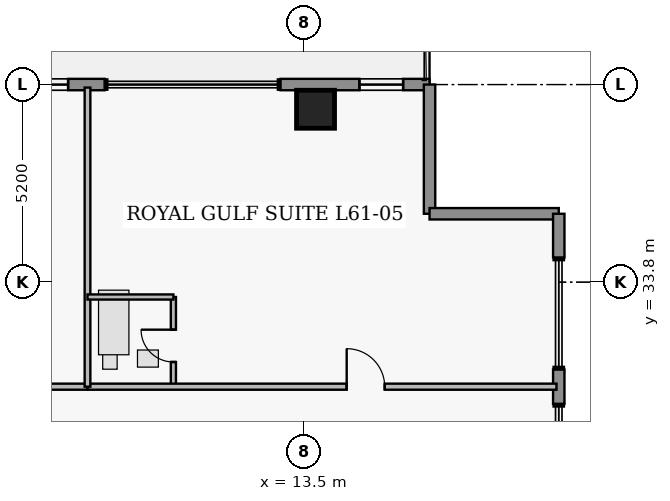
"""IFC4 building model, lengths in metres.
Left out: names, types, materials, properties, quantities, classifications, styles, units other than length and angle.
Written with IfcOpenShell. Run it as: python <this file> out.ifc"""

import sys

from ifc_helpers import new_model, si_unit, direction, frame, frame_2d, origin, origin_2d, place, context, subcontext, project, spatial, rectangle, extrude, element, fill, save


model = new_model("IFC4")
c1 = context("Model", 3, precision=1e-05, world=origin(), true_north=direction((0.0, 1.0)))
c2 = subcontext(c1, "Body", "Model", "MODEL_VIEW")
j1 = project(units=[si_unit("LENGTHUNIT", "METRE"), si_unit("PLANEANGLEUNIT", "RADIAN")], contexts=[c1])
p1 = place(None, origin())
s1 = spatial("IfcSite", under=j1, at=p1, CompositionType="ELEMENT")
p2 = place(p1, origin())
s2 = spatial("IfcBuilding", under=s1, at=p2, CompositionType="ELEMENT")
p3 = place(p2, frame((0.0, 0.0, 243.35)))
s3 = spatial("IfcBuildingStorey", under=s2, at=p3, CompositionType="ELEMENT", Elevation=243.35)
p4 = place(p3, frame((13.8, 38.35, 0.0), z_axis=(0.0, 0.0, 1.0), x_axis=(1.0, 0.0, 0.0)))
e1 = element("IfcColumn", 1, at=p4, inside=s3, PredefinedType="COLUMN", context=c2, shape_type="SweptSolid", body=[
    extrude(rectangle(XDim=1.0, YDim=1.0, at=origin_2d()), origin(), (0.0, 0.0, 1.0), 3.7),
])
p5 = place(p3, frame((-16.8, 39.0, 0.0), z_axis=(0.0, 0.0, 1.0), x_axis=(1.0, 0.0, 0.0)))
e2 = element("IfcWall", 2, at=p5, inside=s3, PredefinedType="STANDARD", context=c2, shape_type="SweptSolid", body=[
    extrude(rectangle(XDim=25.05, YDim=0.3, at=frame_2d((12.525, 0.0))), origin(), (0.0, 0.0, 1.0), 3.48),
])
p6 = place(p5, frame((7.325, 0.0, 0.0)))
e3 = element("IfcOpeningElement", 3, at=p6, cuts=e2, PredefinedType="OPENING", context=c2, shape_type="SweptSolid", body=[
    extrude(rectangle(XDim=1.35, YDim=2.3, at=frame_2d((0.675, 1.15))), frame((0.0, 0.16, 0.0), z_axis=(0.0, -1.0, 0.0), x_axis=(1.0, 0.0, 0.0)), (0.0, 0.0, 1.0), 0.32),
])
p7 = place(p5, frame((15.46, 0.0, 0.85)))
e4 = element("IfcOpeningElement", 4, at=p7, cuts=e2, PredefinedType="OPENING", context=c2, shape_type="SweptSolid", body=[
    extrude(rectangle(XDim=1.6, YDim=1.8, at=frame_2d((0.8, 0.9))), frame((0.0, 0.16, 0.0), z_axis=(0.0, -1.0, 0.0), x_axis=(1.0, 0.0, 0.0)), (0.0, 0.0, 1.0), 0.32),
])
p8 = place(p5, frame((0.695, 0.0, 0.95)))
e5 = element("IfcOpeningElement", 5, at=p8, cuts=e2, PredefinedType="OPENING", context=c2, shape_type="SweptSolid", body=[
    extrude(rectangle(XDim=1.15, YDim=1.55, at=frame_2d((0.575, 0.775))), frame((0.0, 0.16, 0.0), z_axis=(0.0, -1.0, 0.0), x_axis=(1.0, 0.0, 0.0)), (0.0, 0.0, 1.0), 0.32),
])
p9 = place(p5, frame((4.09, 0.0, 0.85)))
e6 = element("IfcOpeningElement", 6, at=p9, cuts=e2, PredefinedType="OPENING", context=c2, shape_type="SweptSolid", body=[
    extrude(rectangle(XDim=1.6, YDim=1.8, at=frame_2d((0.8, 0.9))), frame((0.0, 0.16, 0.0), z_axis=(0.0, -1.0, 0.0), x_axis=(1.0, 0.0, 0.0)), (0.0, 0.0, 1.0), 0.32),
])
p10 = place(p5, frame((9.413, 0.0, 0.85)))
e7 = element("IfcOpeningElement", 7, at=p10, cuts=e2, PredefinedType="OPENING", context=c2, shape_type="SweptSolid", body=[
    extrude(rectangle(XDim=1.6, YDim=1.8, at=frame_2d((0.8, 0.9))), frame((0.0, 0.16, 0.0), z_axis=(0.0, -1.0, 0.0), x_axis=(1.0, 0.0, 0.0)), (0.0, 0.0, 1.0), 0.32),
])
p11 = place(p5, frame((13.48, 0.0, 0.95)))
e8 = element("IfcOpeningElement", 8, at=p11, cuts=e2, PredefinedType="OPENING", context=c2, shape_type="SweptSolid", body=[
    extrude(rectangle(XDim=1.15, YDim=1.55, at=frame_2d((0.575, 0.775))), frame((0.0, 0.16, 0.0), z_axis=(0.0, -1.0, 0.0), x_axis=(1.0, 0.0, 0.0)), (0.0, 0.0, 1.0), 0.32),
])
p12 = place(p5, frame((18.61, 0.0, 0.85)))
e9 = element("IfcOpeningElement", 9, at=p12, cuts=e2, PredefinedType="OPENING", context=c2, shape_type="SweptSolid", body=[
    extrude(rectangle(XDim=1.6, YDim=1.8, at=frame_2d((0.8, 0.9))), frame((0.0, 0.16, 0.0), z_axis=(0.0, -1.0, 0.0), x_axis=(1.0, 0.0, 0.0)), (0.0, 0.0, 1.0), 0.32),
])
p13 = place(p5, frame((22.49, 0.0, 0.85)))
e10 = element("IfcOpeningElement", 10, at=p13, cuts=e2, PredefinedType="OPENING", context=c2, shape_type="SweptSolid", body=[
    extrude(rectangle(XDim=1.6, YDim=1.8, at=frame_2d((0.8, 0.9))), frame((0.0, 0.16, 0.0), z_axis=(0.0, -1.0, 0.0), x_axis=(1.0, 0.0, 0.0)), (0.0, 0.0, 1.0), 0.32),
])
p14 = place(p3, frame((12.88, 39.0, 0.0), z_axis=(0.0, 0.0, 1.0), x_axis=(1.0, 0.0, 0.0)))
e11 = element("IfcWall", 11, at=p14, inside=s3, PredefinedType="STANDARD", context=c2, shape_type="SweptSolid", body=[
    extrude(rectangle(XDim=3.92, YDim=0.3, at=frame_2d((1.96, 0.0))), origin(), (0.0, 0.0, 1.0), 3.48),
])
p15 = place(p14, frame((2.075, 0.0, 0.95)))
e12 = element("IfcOpeningElement", 12, at=p15, cuts=e11, PredefinedType="OPENING", context=c2, shape_type="SweptSolid", body=[
    extrude(rectangle(XDim=1.15, YDim=1.55, at=frame_2d((0.575, 0.775))), frame((0.0, 0.16, 0.0), z_axis=(0.0, -1.0, 0.0), x_axis=(1.0, 0.0, 0.0)), (0.0, 0.0, 1.0), 0.32),
])
for number, where, z_axis, x_axis in (
    (13, (16.8, 39.0, 0.0), (0.0, 0.0, 1.0), (0.0, -1.0, 0.0)),
    (14, (16.8, 35.6, 0.0), (0.0, 0.0, 1.0), (1.0, 0.0, 0.0)),
):
    element("IfcWall", number, at=place(p3, frame(where, z_axis=z_axis, x_axis=x_axis)), inside=s3, PredefinedType="STANDARD", context=c2, shape_type="SweptSolid", body=[
        extrude(rectangle(XDim=3.4, YDim=0.3, at=frame_2d((1.7, 0.0))), origin(), (0.0, 0.0, 1.0), 3.48),
    ])
p16 = place(p3, frame((20.2, 35.6, 0.0), z_axis=(0.0, 0.0, 1.0), x_axis=(0.0, -1.0, 0.0)))
e15 = element("IfcWall", 15, at=p16, inside=s3, PredefinedType="STANDARD", context=c2, shape_type="SweptSolid", body=[
    extrude(rectangle(XDim=1.15, YDim=0.3, at=frame_2d((0.575, 0.0))), origin(), (0.0, 0.0, 1.0), 3.48),
])
p17 = place(p3, frame((20.2, 31.5, 0.0), z_axis=(0.0, 0.0, 1.0), x_axis=(0.0, -1.0, 0.0)))
e16 = element("IfcWall", 16, at=p17, inside=s3, PredefinedType="STANDARD", context=c2, shape_type="SweptSolid", body=[
    extrude(rectangle(XDim=0.9, YDim=0.3, at=frame_2d((0.45, 0.0))), origin(), (0.0, 0.0, 1.0), 3.48),
])
p18 = place(p3, frame((1.2, 31.05, 0.0), z_axis=(0.0, 0.0, 1.0), x_axis=(1.0, 0.0, 0.0)))
e17 = element("IfcWall", 17, at=p18, inside=s3, PredefinedType="PARTITIONING", context=c2, shape_type="SweptSolid", body=[
    extrude(rectangle(XDim=6.6, YDim=0.16, at=frame_2d((3.3, 0.0))), origin(), (0.0, 0.0, 1.0), 3.48),
])
p19 = place(p18, frame((3.95, 0.0, 0.0)))
e18 = element("IfcOpeningElement", 18, at=p19, cuts=e17, PredefinedType="OPENING", context=c2, shape_type="SweptSolid", body=[
    extrude(rectangle(XDim=1.0, YDim=2.15, at=frame_2d((0.5, 1.075))), frame((0.0, 0.09, 0.0), z_axis=(0.0, -1.0, 0.0), x_axis=(1.0, 0.0, 0.0)), (0.0, 0.0, 1.0), 0.18),
])
p20 = place(p3, frame((10.06, 31.05, 0.0), z_axis=(0.0, 0.0, 1.0), x_axis=(0.0, 1.0, 0.0)))
e19 = element("IfcWall", 19, at=p20, inside=s3, PredefinedType="PLUMBINGWALL", context=c2, shape_type="SweptSolid", body=[
    extrude(rectangle(XDim=2.36, YDim=0.135, at=frame_2d((1.18, 0.0))), origin(), (0.0, 0.0, 1.0), 3.48),
])
p21 = place(p20, frame((0.65, 0.0, 0.0)))
e20 = element("IfcOpeningElement", 20, at=p21, cuts=e19, PredefinedType="OPENING", context=c2, shape_type="SweptSolid", body=[
    extrude(rectangle(XDim=0.85, YDim=2.1, at=frame_2d((0.425, 1.05))), frame((0.0, 0.077, 0.0), z_axis=(0.0, -1.0, 0.0), x_axis=(1.0, 0.0, 0.0)), (0.0, 0.0, 1.0), 0.155),
])
p22 = place(p3, frame((7.8, 31.05, 0.0), z_axis=(0.0, 0.0, 1.0), x_axis=(1.0, 0.0, 0.0)))
e21 = element("IfcWall", 21, at=p22, inside=s3, PredefinedType="PARTITIONING", context=c2, shape_type="SweptSolid", body=[
    extrude(rectangle(XDim=12.34, YDim=0.16, at=frame_2d((6.17, 0.0))), origin(), (0.0, 0.0, 1.0), 3.48),
])
p23 = place(p22, frame((6.82, 0.0, 0.0)))
e22 = element("IfcOpeningElement", 22, at=p23, cuts=e21, PredefinedType="OPENING", context=c2, shape_type="SweptSolid", body=[
    extrude(rectangle(XDim=1.0, YDim=2.15, at=frame_2d((0.5, 1.075))), frame((0.0, 0.09, 0.0), z_axis=(0.0, -1.0, 0.0), x_axis=(1.0, 0.0, 0.0)), (0.0, 0.0, 1.0), 0.18),
])
p24 = place(p3, frame((7.8, 31.05, 0.0), z_axis=(0.0, 0.0, 1.0), x_axis=(0.0, 1.0, 0.0)))
e23 = element("IfcWall", 23, at=p24, inside=s3, PredefinedType="PARTITIONING", context=c2, shape_type="SweptSolid", body=[
    extrude(rectangle(XDim=7.87, YDim=0.15, at=frame_2d((3.935, 0.0))), origin(), (0.0, 0.0, 1.0), 3.48),
])
p25 = place(p3, frame((7.8, 33.41, 0.0), z_axis=(0.0, 0.0, 1.0), x_axis=(1.0, 0.0, 0.0)))
e24 = element("IfcWall", 24, at=p25, inside=s3, PredefinedType="PLUMBINGWALL", context=c2, shape_type="SweptSolid", body=[
    extrude(rectangle(XDim=2.26, YDim=0.135, at=frame_2d((1.13, 0.0))), origin(), (0.0, 0.0, 1.0), 3.076),
])
p26 = place(p13, origin())
e25 = element("IfcWindow", 25, at=p26, inside=s3, PartitioningType="SINGLE_PANEL", PredefinedType="WINDOW", context=c2, shape_type="SweptSolid", body=[
    extrude(rectangle(XDim=1.6, YDim=1.8, at=frame_2d((0.8, 0.9))), frame((0.0, 0.03, 0.0), z_axis=(0.0, -1.0, 0.0), x_axis=(1.0, 0.0, 0.0)), (0.0, 0.0, 1.0), 0.06),
])
fill(e10, e25)
p27 = place(p15, origin())
e26 = element("IfcWindow", 26, at=p27, inside=s3, PartitioningType="SINGLE_PANEL", PredefinedType="WINDOW", context=c2, shape_type="SweptSolid", body=[
    extrude(rectangle(XDim=1.15, YDim=1.55, at=frame_2d((0.575, 0.775))), frame((0.0, 0.03, 0.0), z_axis=(0.0, -1.0, 0.0), x_axis=(1.0, 0.0, 0.0)), (0.0, 0.0, 1.0), 0.06),
])
fill(e12, e26)
p28 = place(p21, origin())
e27 = element("IfcDoor", 27, at=p28, inside=s3, OperationType="SINGLE_SWING_RIGHT", PredefinedType="DOOR", context=c2, shape_type="SweptSolid", body=[
    extrude(rectangle(XDim=0.85, YDim=2.1, at=frame_2d((0.425, 1.05))), frame((0.0, 0.025, 0.0), z_axis=(0.0, -1.0, 0.0), x_axis=(1.0, 0.0, 0.0)), (0.0, 0.0, 1.0), 0.05),
])
fill(e20, e27)
p29 = place(p23, origin())
e28 = element("IfcDoor", 28, at=p29, inside=s3, OperationType="SINGLE_SWING_LEFT", PredefinedType="DOOR", context=c2, shape_type="SweptSolid", body=[
    extrude(rectangle(XDim=1.0, YDim=2.15, at=frame_2d((0.5, 1.075))), frame((0.0, 0.025, 0.0), z_axis=(0.0, -1.0, 0.0), x_axis=(1.0, 0.0, 0.0)), (0.0, 0.0, 1.0), 0.05),
])
fill(e22, e28)
save(model, sys.argv[1])
